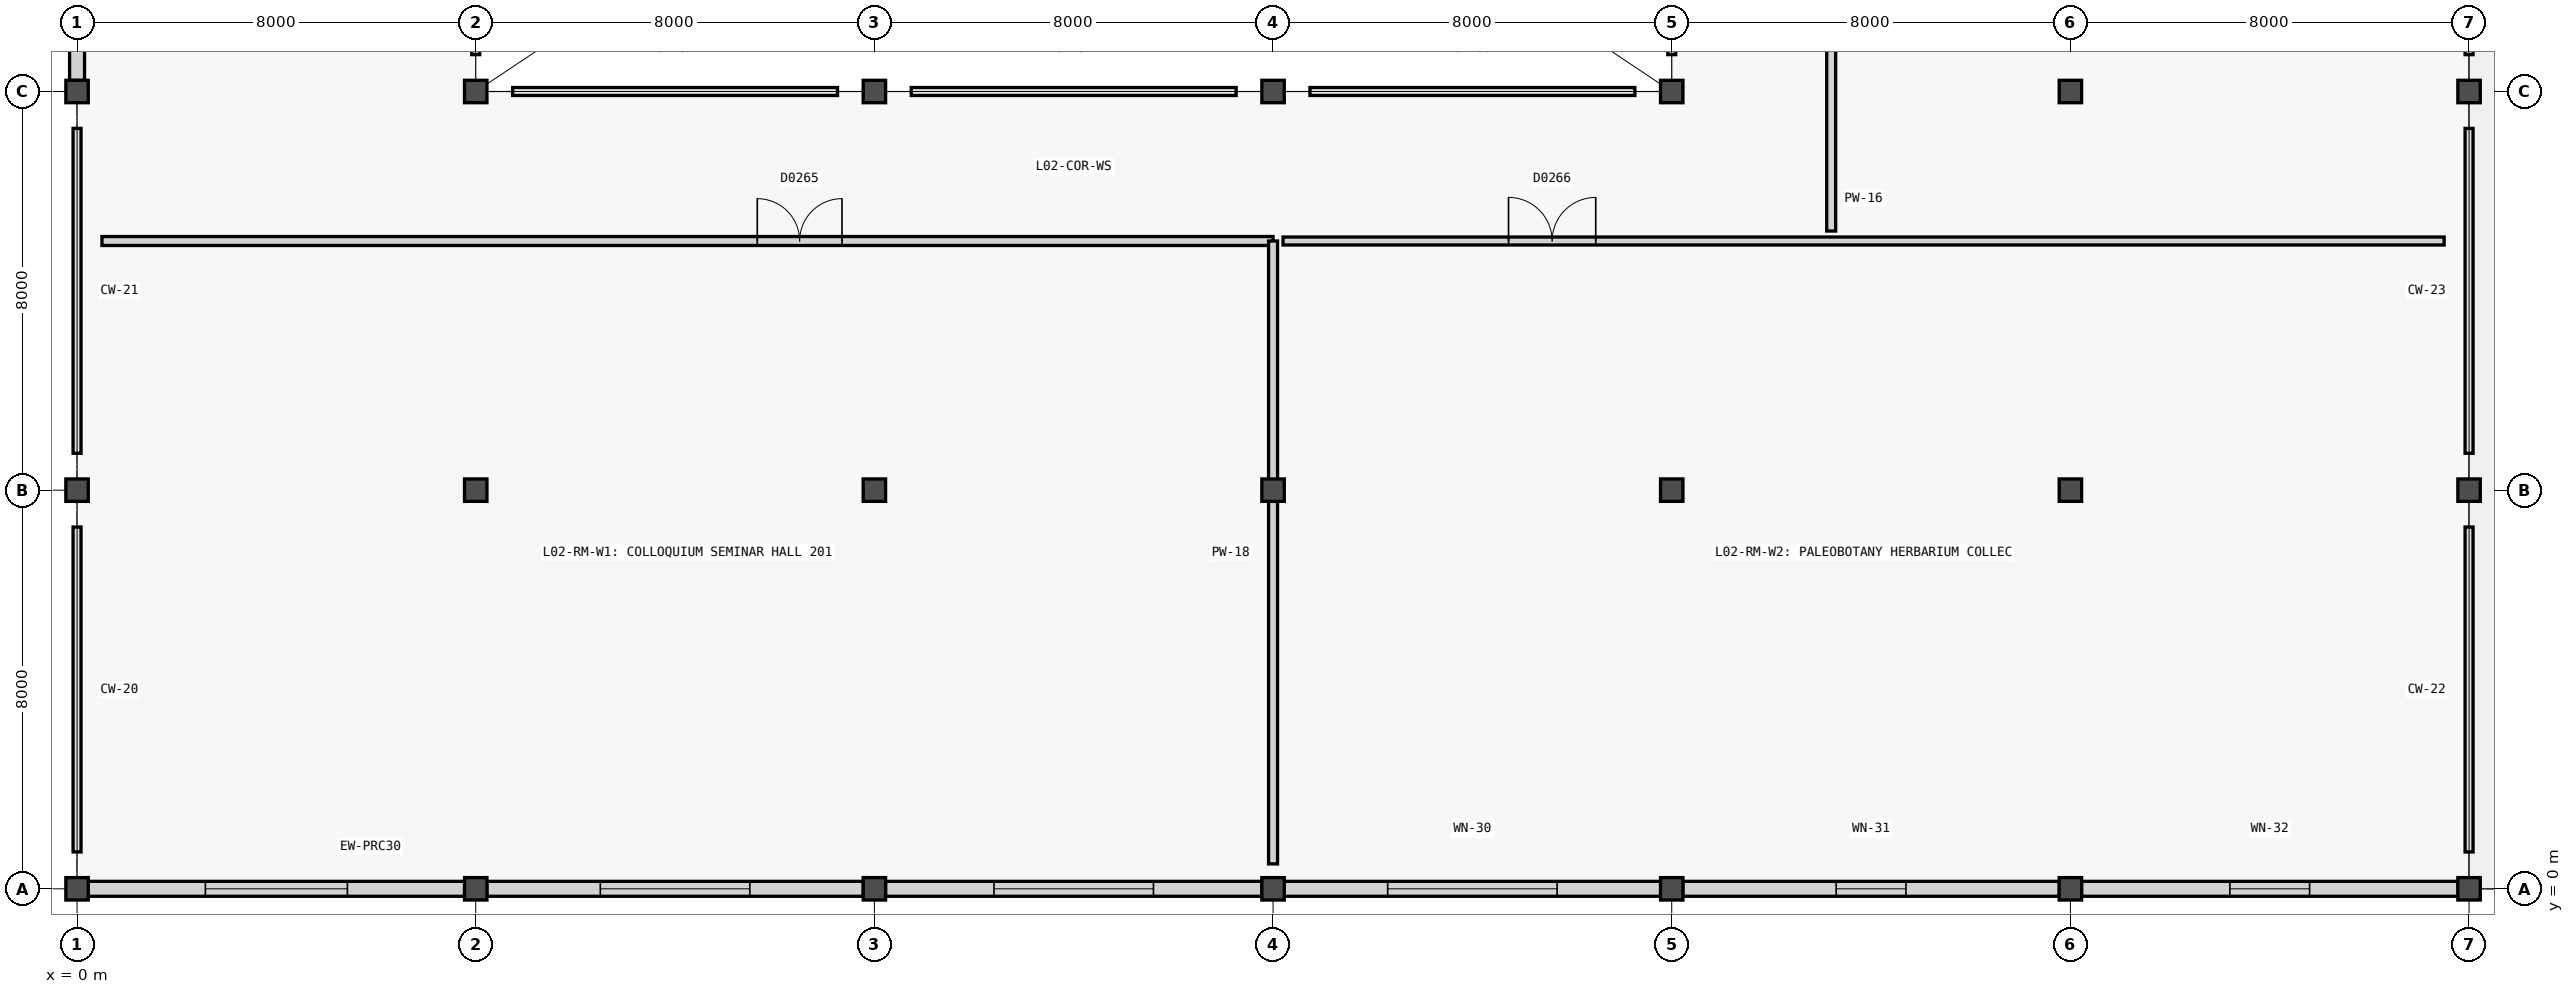
"""IFC4 building model, lengths in metres.
Left out: names, types, materials, properties, quantities, classifications, styles, units other than length and angle.
Written with IfcOpenShell. Run it as: python <this file> out.ifc"""

import sys

from ifc_helpers import new_model, si_unit, direction, frame, frame_2d, origin, origin_2d, place, context, subcontext, project, spatial, rectangle, extrude, element, fill, save


model = new_model("IFC4")
c1 = context("Model", 3, precision=1e-05, world=origin(), true_north=direction((0.0, 1.0)))
c2 = subcontext(c1, "Body", "Model", "MODEL_VIEW")
j1 = project(units=[si_unit("LENGTHUNIT", "METRE"), si_unit("PLANEANGLEUNIT", "RADIAN")], contexts=[c1])
p1 = place(None, origin())
s1 = spatial("IfcSite", under=j1, at=p1, CompositionType="ELEMENT")
p2 = place(p1, origin())
s2 = spatial("IfcBuilding", under=s1, at=p2, CompositionType="ELEMENT")
p3 = place(p2, frame((0.0, 0.0, 10.2)))
s3 = spatial("IfcBuildingStorey", under=s2, at=p3, CompositionType="ELEMENT", Elevation=10.2)
for number, where, z_axis, x_axis in (
    (1, (0.0, 0.0, 0.0), (0.0, 0.0, 1.0), (1.0, 0.0, 0.0)),
    (2, (0.0, 8.0, 0.0), (0.0, 0.0, 1.0), (1.0, 0.0, 0.0)),
    (3, (0.0, 16.0, 0.0), (0.0, 0.0, 1.0), (1.0, 0.0, 0.0)),
    (4, (8.0, 0.0, 0.0), (0.0, 0.0, 1.0), (1.0, 0.0, 0.0)),
    (5, (8.0, 8.0, 0.0), (0.0, 0.0, 1.0), (1.0, 0.0, 0.0)),
    (6, (8.0, 16.0, 0.0), (0.0, 0.0, 1.0), (1.0, 0.0, 0.0)),
    (7, (16.0, 0.0, 0.0), (0.0, 0.0, 1.0), (1.0, 0.0, 0.0)),
    (8, (16.0, 8.0, 0.0), (0.0, 0.0, 1.0), (1.0, 0.0, 0.0)),
    (9, (16.0, 16.0, 0.0), (0.0, 0.0, 1.0), (1.0, 0.0, 0.0)),
    (10, (24.0, 0.0, 0.0), (0.0, 0.0, 1.0), (1.0, 0.0, 0.0)),
    (11, (24.0, 8.0, 0.0), (0.0, 0.0, 1.0), (1.0, 0.0, 0.0)),
    (12, (24.0, 16.0, 0.0), (0.0, 0.0, 1.0), (1.0, 0.0, 0.0)),
    (13, (32.0, 0.0, 0.0), (0.0, 0.0, 1.0), (1.0, 0.0, 0.0)),
    (14, (32.0, 8.0, 0.0), (0.0, 0.0, 1.0), (1.0, 0.0, 0.0)),
    (15, (32.0, 16.0, 0.0), (0.0, 0.0, 1.0), (1.0, 0.0, 0.0)),
    (16, (40.0, 0.0, 0.0), (0.0, 0.0, 1.0), (1.0, 0.0, 0.0)),
    (17, (40.0, 8.0, 0.0), (0.0, 0.0, 1.0), (1.0, 0.0, 0.0)),
    (18, (40.0, 16.0, 0.0), (0.0, 0.0, 1.0), (1.0, 0.0, 0.0)),
    (19, (48.0, 0.0, 0.0), (0.0, 0.0, 1.0), (1.0, 0.0, 0.0)),
    (20, (48.0, 8.0, 0.0), (0.0, 0.0, 1.0), (1.0, 0.0, 0.0)),
    (21, (48.0, 16.0, 0.0), (0.0, 0.0, 1.0), (1.0, 0.0, 0.0)),
):
    element("IfcColumn", number, at=place(p3, frame(where, z_axis=z_axis, x_axis=x_axis)), inside=s3, PredefinedType="COLUMN", context=c2, shape_type="SweptSolid", body=[
        extrude(rectangle(XDim=0.45, YDim=0.45, at=origin_2d()), origin(), (0.0, 0.0, 1.0), 4.2),
    ])
p4 = place(p3, frame((0.0, 16.223, 0.0), z_axis=(0.0, 0.0, 1.0), x_axis=(0.0, 1.0, 0.0)))
e22 = element("IfcWall", 22, at=p4, inside=s3, PredefinedType="SOLIDWALL", context=c2, shape_type="SweptSolid", body=[
    extrude(rectangle(XDim=7.554, YDim=0.3, at=frame_2d((3.777, 0.0))), origin(), (0.0, 0.0, 1.0), 3.36),
])
p5 = place(p4, frame((2.352, 0.0, 0.88)))
e23 = element("IfcOpeningElement", 23, at=p5, cuts=e22, PredefinedType="OPENING", context=c2, shape_type="SweptSolid", body=[
    extrude(rectangle(XDim=2.85, YDim=1.75, at=frame_2d((1.425, 0.875))), frame((0.0, 0.16, 0.0), z_axis=(0.0, -1.0, 0.0), x_axis=(1.0, 0.0, 0.0)), (0.0, 0.0, 1.0), 0.32),
])
p6 = place(p3, frame((7.777, 0.0, 0.0), z_axis=(0.0, 0.0, 1.0), x_axis=(-1.0, 0.0, 0.0)))
e24 = element("IfcWall", 24, at=p6, inside=s3, PredefinedType="SOLIDWALL", context=c2, shape_type="SweptSolid", body=[
    extrude(rectangle(XDim=7.554, YDim=0.3, at=frame_2d((3.777, 0.0))), origin(), (0.0, 0.0, 1.0), 3.46),
])
p7 = place(p6, frame((2.352, 0.0, 0.88)))
e25 = element("IfcOpeningElement", 25, at=p7, cuts=e24, PredefinedType="OPENING", context=c2, shape_type="SweptSolid", body=[
    extrude(rectangle(XDim=2.85, YDim=1.75, at=frame_2d((1.425, 0.875))), frame((0.0, 0.16, 0.0), z_axis=(0.0, -1.0, 0.0), x_axis=(1.0, 0.0, 0.0)), (0.0, 0.0, 1.0), 0.32),
])
p8 = place(p3, frame((15.777, 0.0, 0.0), z_axis=(0.0, 0.0, 1.0), x_axis=(-1.0, 0.0, 0.0)))
e26 = element("IfcWall", 26, at=p8, inside=s3, PredefinedType="SOLIDWALL", context=c2, shape_type="SweptSolid", body=[
    extrude(rectangle(XDim=7.554, YDim=0.3, at=frame_2d((3.777, 0.0))), origin(), (0.0, 0.0, 1.0), 3.46),
])
p9 = place(p8, frame((2.277, 0.0, 0.88)))
e27 = element("IfcOpeningElement", 27, at=p9, cuts=e26, PredefinedType="OPENING", context=c2, shape_type="SweptSolid", body=[
    extrude(rectangle(XDim=3.0, YDim=1.8, at=frame_2d((1.5, 0.9))), frame((0.0, 0.16, 0.0), z_axis=(0.0, -1.0, 0.0), x_axis=(1.0, 0.0, 0.0)), (0.0, 0.0, 1.0), 0.32),
])
p10 = place(p3, frame((23.777, 0.0, 0.0), z_axis=(0.0, 0.0, 1.0), x_axis=(-1.0, 0.0, 0.0)))
e28 = element("IfcWall", 28, at=p10, inside=s3, PredefinedType="SOLIDWALL", context=c2, shape_type="SweptSolid", body=[
    extrude(rectangle(XDim=7.554, YDim=0.3, at=frame_2d((3.777, 0.0))), origin(), (0.0, 0.0, 1.0), 3.46),
])
p11 = place(p10, frame((2.177, 0.0, 0.88)))
e29 = element("IfcOpeningElement", 29, at=p11, cuts=e28, PredefinedType="OPENING", context=c2, shape_type="SweptSolid", body=[
    extrude(rectangle(XDim=3.2, YDim=1.9, at=frame_2d((1.6, 0.95))), frame((0.0, 0.16, 0.0), z_axis=(0.0, -1.0, 0.0), x_axis=(1.0, 0.0, 0.0)), (0.0, 0.0, 1.0), 0.32),
])
p12 = place(p3, frame((31.777, 0.0, 0.0), z_axis=(0.0, 0.0, 1.0), x_axis=(-1.0, 0.0, 0.0)))
e30 = element("IfcWall", 30, at=p12, inside=s3, PredefinedType="SOLIDWALL", context=c2, shape_type="SweptSolid", body=[
    extrude(rectangle(XDim=7.554, YDim=0.3, at=frame_2d((3.777, 0.0))), origin(), (0.0, 0.0, 1.0), 3.46),
])
p13 = place(p12, frame((2.077, 0.0, 0.88)))
e31 = element("IfcOpeningElement", 31, at=p13, cuts=e30, PredefinedType="OPENING", context=c2, shape_type="SweptSolid", body=[
    extrude(rectangle(XDim=3.4, YDim=2.0, at=frame_2d((1.7, 1.0))), frame((0.0, 0.16, 0.0), z_axis=(0.0, -1.0, 0.0), x_axis=(1.0, 0.0, 0.0)), (0.0, 0.0, 1.0), 0.32),
])
p14 = place(p3, frame((39.777, 0.0, 0.0), z_axis=(0.0, 0.0, 1.0), x_axis=(-1.0, 0.0, 0.0)))
e32 = element("IfcWall", 32, at=p14, inside=s3, PredefinedType="SOLIDWALL", context=c2, shape_type="SweptSolid", body=[
    extrude(rectangle(XDim=7.554, YDim=0.3, at=frame_2d((3.777, 0.0))), origin(), (0.0, 0.0, 1.0), 3.46),
])
p15 = place(p14, frame((3.077, 0.0, 0.88)))
e33 = element("IfcOpeningElement", 33, at=p15, cuts=e32, PredefinedType="OPENING", context=c2, shape_type="SweptSolid", body=[
    extrude(rectangle(XDim=1.4, YDim=1.85, at=frame_2d((0.7, 0.925))), frame((0.0, 0.16, 0.0), z_axis=(0.0, -1.0, 0.0), x_axis=(1.0, 0.0, 0.0)), (0.0, 0.0, 1.0), 0.32),
])
p16 = place(p3, frame((47.777, 0.0, 0.0), z_axis=(0.0, 0.0, 1.0), x_axis=(-1.0, 0.0, 0.0)))
e34 = element("IfcWall", 34, at=p16, inside=s3, PredefinedType="SOLIDWALL", context=c2, shape_type="SweptSolid", body=[
    extrude(rectangle(XDim=7.554, YDim=0.3, at=frame_2d((3.777, 0.0))), origin(), (0.0, 0.0, 1.0), 3.46),
])
p17 = place(p16, frame((2.977, 0.0, 0.88)))
e35 = element("IfcOpeningElement", 35, at=p17, cuts=e34, PredefinedType="OPENING", context=c2, shape_type="SweptSolid", body=[
    extrude(rectangle(XDim=1.6, YDim=1.95, at=frame_2d((0.8, 0.975))), frame((0.0, 0.16, 0.0), z_axis=(0.0, -1.0, 0.0), x_axis=(1.0, 0.0, 0.0)), (0.0, 0.0, 1.0), 0.32),
])
p18 = place(p3, frame((0.5, 13.0, 0.0), z_axis=(0.0, 0.0, 1.0), x_axis=(1.0, 0.0, 0.0)))
e36 = element("IfcWall", 36, at=p18, inside=s3, PredefinedType="PARTITIONING", context=c2, shape_type="SweptSolid", body=[
    extrude(rectangle(XDim=23.5, YDim=0.18, at=frame_2d((11.75, 0.0))), origin(), (0.0, 0.0, 1.0), 3.94),
])
p19 = place(p18, frame((13.15, 0.0, 0.0)))
e37 = element("IfcOpeningElement", 37, at=p19, cuts=e36, PredefinedType="OPENING", context=c2, shape_type="SweptSolid", body=[
    extrude(rectangle(XDim=1.7, YDim=2.25, at=frame_2d((0.85, 1.125))), frame((0.0, 0.1, 0.0), z_axis=(0.0, -1.0, 0.0), x_axis=(1.0, 0.0, 0.0)), (0.0, 0.0, 1.0), 0.2),
])
p20 = place(p3, frame((24.0, 0.5, 0.0), z_axis=(0.0, 0.0, 1.0), x_axis=(0.0, 1.0, 0.0)))
e38 = element("IfcWall", 38, at=p20, inside=s3, PredefinedType="PARTITIONING", context=c2, shape_type="SweptSolid", body=[
    extrude(rectangle(XDim=12.5, YDim=0.18, at=frame_2d((6.25, 0.0))), origin(), (0.0, 0.0, 1.0), 3.36),
])
p21 = place(p3, frame((24.2, 13.0, 0.0), z_axis=(0.0, 0.0, 1.0), x_axis=(1.0, 0.0, 0.0)))
e39 = element("IfcWall", 39, at=p21, inside=s3, PredefinedType="PARTITIONING", context=c2, shape_type="SweptSolid", body=[
    extrude(rectangle(XDim=23.3, YDim=0.16, at=frame_2d((11.65, 0.0))), origin(), (0.0, 0.0, 1.0), 3.94),
])
p22 = place(p21, frame((4.525, 0.0, 0.0)))
e40 = element("IfcOpeningElement", 40, at=p22, cuts=e39, PredefinedType="OPENING", context=c2, shape_type="SweptSolid", body=[
    extrude(rectangle(XDim=1.75, YDim=2.2, at=frame_2d((0.875, 1.1))), frame((0.0, 0.09, 0.0), z_axis=(0.0, -1.0, 0.0), x_axis=(1.0, 0.0, 0.0)), (0.0, 0.0, 1.0), 0.18),
])
p23 = place(p3, frame((35.2, 13.2, 0.0), z_axis=(0.0, 0.0, 1.0), x_axis=(0.0, 1.0, 0.0)))
e41 = element("IfcWall", 41, at=p23, inside=s3, PredefinedType="PARTITIONING", context=c2, shape_type="SweptSolid", body=[
    extrude(rectangle(XDim=26.6, YDim=0.18, at=frame_2d((13.3, 0.0))), origin(), (0.0, 0.0, 1.0), 3.94),
])
p24 = place(p23, frame((13.725, 0.0, 0.0)))
e42 = element("IfcOpeningElement", 42, at=p24, cuts=e41, PredefinedType="OPENING", context=c2, shape_type="SweptSolid", body=[
    extrude(rectangle(XDim=1.95, YDim=2.35, at=frame_2d((0.975, 1.175))), frame((0.0, 0.1, 0.0), z_axis=(0.0, -1.0, 0.0), x_axis=(1.0, 0.0, 0.0)), (0.0, 0.0, 1.0), 0.2),
])
p25 = place(p7, origin())
e43 = element("IfcWindow", 43, at=p25, inside=s3, PartitioningType="SINGLE_PANEL", PredefinedType="WINDOW", context=c2, shape_type="SweptSolid", body=[
    extrude(rectangle(XDim=2.85, YDim=1.75, at=frame_2d((1.425, 0.875))), frame((0.0, 0.03, 0.0), z_axis=(0.0, -1.0, 0.0), x_axis=(1.0, 0.0, 0.0)), (0.0, 0.0, 1.0), 0.06),
])
fill(e25, e43)
p26 = place(p9, origin())
e44 = element("IfcWindow", 44, at=p26, inside=s3, PartitioningType="SINGLE_PANEL", PredefinedType="WINDOW", context=c2, shape_type="SweptSolid", body=[
    extrude(rectangle(XDim=3.0, YDim=1.8, at=frame_2d((1.5, 0.9))), frame((0.0, 0.03, 0.0), z_axis=(0.0, -1.0, 0.0), x_axis=(1.0, 0.0, 0.0)), (0.0, 0.0, 1.0), 0.06),
])
fill(e27, e44)
p27 = place(p11, origin())
e45 = element("IfcWindow", 45, at=p27, inside=s3, PartitioningType="SINGLE_PANEL", PredefinedType="WINDOW", context=c2, shape_type="SweptSolid", body=[
    extrude(rectangle(XDim=3.2, YDim=1.9, at=frame_2d((1.6, 0.95))), frame((0.0, 0.03, 0.0), z_axis=(0.0, -1.0, 0.0), x_axis=(1.0, 0.0, 0.0)), (0.0, 0.0, 1.0), 0.06),
])
fill(e29, e45)
p28 = place(p13, origin())
e46 = element("IfcWindow", 46, at=p28, inside=s3, PartitioningType="SINGLE_PANEL", PredefinedType="WINDOW", context=c2, shape_type="SweptSolid", body=[
    extrude(rectangle(XDim=3.4, YDim=2.0, at=frame_2d((1.7, 1.0))), frame((0.0, 0.03, 0.0), z_axis=(0.0, -1.0, 0.0), x_axis=(1.0, 0.0, 0.0)), (0.0, 0.0, 1.0), 0.06),
])
fill(e31, e46)
p29 = place(p15, origin())
e47 = element("IfcWindow", 47, at=p29, inside=s3, PartitioningType="SINGLE_PANEL", PredefinedType="WINDOW", context=c2, shape_type="SweptSolid", body=[
    extrude(rectangle(XDim=1.4, YDim=1.85, at=frame_2d((0.7, 0.925))), frame((0.0, 0.03, 0.0), z_axis=(0.0, -1.0, 0.0), x_axis=(1.0, 0.0, 0.0)), (0.0, 0.0, 1.0), 0.06),
])
fill(e33, e47)
p30 = place(p17, origin())
e48 = element("IfcWindow", 48, at=p30, inside=s3, PartitioningType="SINGLE_PANEL", PredefinedType="WINDOW", context=c2, shape_type="SweptSolid", body=[
    extrude(rectangle(XDim=1.6, YDim=1.95, at=frame_2d((0.8, 0.975))), frame((0.0, 0.03, 0.0), z_axis=(0.0, -1.0, 0.0), x_axis=(1.0, 0.0, 0.0)), (0.0, 0.0, 1.0), 0.06),
])
fill(e35, e48)
p31 = place(p19, origin())
e49 = element("IfcDoor", 49, at=p31, inside=s3, OperationType="DOUBLE_DOOR_SINGLE_SWING", PredefinedType="DOOR", context=c2, shape_type="SweptSolid", body=[
    extrude(rectangle(XDim=1.7, YDim=2.25, at=frame_2d((0.85, 1.125))), frame((0.0, 0.025, 0.0), z_axis=(0.0, -1.0, 0.0), x_axis=(1.0, 0.0, 0.0)), (0.0, 0.0, 1.0), 0.05),
])
fill(e37, e49)
p32 = place(p22, origin())
e50 = element("IfcDoor", 50, at=p32, inside=s3, OperationType="DOUBLE_DOOR_SINGLE_SWING", PredefinedType="DOOR", context=c2, shape_type="SweptSolid", body=[
    extrude(rectangle(XDim=1.75, YDim=2.2, at=frame_2d((0.875, 1.1))), frame((0.0, 0.025, 0.0), z_axis=(0.0, -1.0, 0.0), x_axis=(1.0, 0.0, 0.0)), (0.0, 0.0, 1.0), 0.05),
])
fill(e40, e50)
save(model, sys.argv[1])
